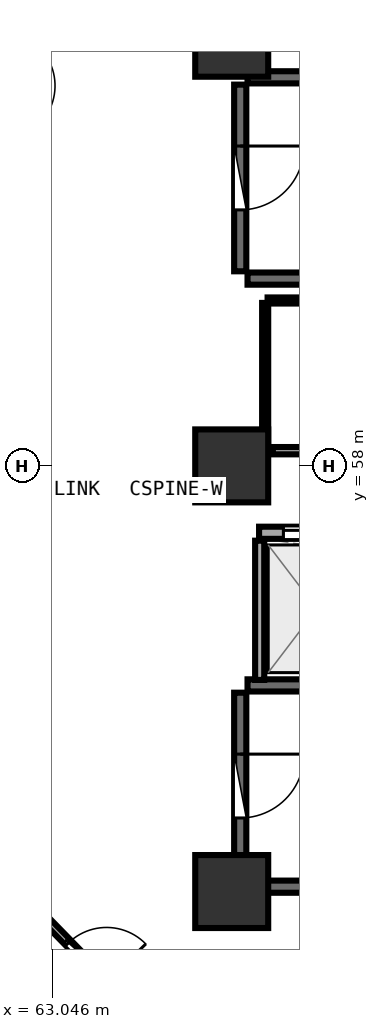
"""IFC4 building model, lengths in metres.
Left out: names, types, materials, properties, quantities, classifications, styles, units other than length and angle.
Written with IfcOpenShell. Run it as: python <this file> out.ifc"""

import sys

from ifc_helpers import new_model, si_unit, direction, frame, frame_2d, origin, origin_2d, place, context, subcontext, project, spatial, rectangle, extrude, element, fill, save


model = new_model("IFC4")
c1 = context("Model", 3, precision=1e-05, world=origin(), true_north=direction((0.0, 1.0)))
c2 = subcontext(c1, "Body", "Model", "MODEL_VIEW")
j1 = project(units=[si_unit("LENGTHUNIT", "METRE"), si_unit("PLANEANGLEUNIT", "RADIAN")], contexts=[c1])
p1 = place(None, origin())
s1 = spatial("IfcSite", under=j1, at=p1, CompositionType="ELEMENT")
p2 = place(p1, origin())
s2 = spatial("IfcBuilding", under=s1, at=p2, CompositionType="ELEMENT")
p3 = place(p2, frame((0.0, 0.0, 161.85)))
s3 = spatial("IfcBuildingStorey", under=s2, at=p3, CompositionType="ELEMENT", Elevation=161.85)
for number, where, z_axis, x_axis in (
    (1, (66.0, 51.0, 0.0), (0.0, 0.0, 1.0), (1.0, 0.0, 0.0)),
    (2, (66.0, 65.0, 0.0), (0.0, 0.0, 1.0), (1.0, 0.0, 0.0)),
    (3, (66.0, 58.0, 0.0), (0.0, 0.0, 1.0), (1.0, 0.0, 0.0)),
):
    element("IfcColumn", number, at=place(p3, frame(where, z_axis=z_axis, x_axis=x_axis)), inside=s3, PredefinedType="PILASTER", context=c2, shape_type="SweptSolid", body=[
        extrude(rectangle(XDim=1.2, YDim=1.2, at=origin_2d()), origin(), (0.0, 0.0, 1.0), 3.75),
    ])
for number, where, z_axis, x_axis in (
    (4, (66.26, 61.08, 0.0), (0.0, 0.0, 1.0), (1.0, 0.0, 0.0)),
    (5, (73.42, 64.39, 0.0), (0.0, 0.0, 1.0), (-1.0, 0.0, 0.0)),
):
    element("IfcWall", number, at=place(p3, frame(where, z_axis=z_axis, x_axis=x_axis)), inside=s3, PredefinedType="SHEAR", context=c2, shape_type="SweptSolid", body=[
        extrude(rectangle(XDim=7.16, YDim=0.2, at=frame_2d((3.58, 0.0))), origin(), (0.0, 0.0, 1.0), 3.49),
    ])
p4 = place(p3, frame((66.14, 64.27, 0.0), z_axis=(0.0, 0.0, 1.0), x_axis=(0.0, -1.0, 0.0)))
e6 = element("IfcWall", 6, at=p4, inside=s3, PredefinedType="SHEAR", context=c2, shape_type="SweptSolid", body=[
    extrude(rectangle(XDim=3.07, YDim=0.2, at=frame_2d((1.535, 0.0))), origin(), (0.0, 0.0, 1.0), 3.49),
])
p5 = place(p4, frame((1.01, 0.0, 0.0)))
e7 = element("IfcOpeningElement", 7, at=p5, cuts=e6, PredefinedType="OPENING", context=c2, shape_type="SweptSolid", body=[
    extrude(rectangle(XDim=1.05, YDim=2.1, at=frame_2d((0.525, 1.05))), frame((0.0, 0.11, 0.0), z_axis=(0.0, -1.0, 0.0), x_axis=(1.0, 0.0, 0.0)), (0.0, 0.0, 1.0), 0.22),
])
for number, where, z_axis, x_axis in (
    (8, (66.26, 51.08, 0.0), (0.0, 0.0, 1.0), (1.0, 0.0, 0.0)),
    (9, (73.42, 54.39, 0.0), (0.0, 0.0, 1.0), (-1.0, 0.0, 0.0)),
):
    element("IfcWall", number, at=place(p3, frame(where, z_axis=z_axis, x_axis=x_axis)), inside=s3, PredefinedType="SHEAR", context=c2, shape_type="SweptSolid", body=[
        extrude(rectangle(XDim=7.16, YDim=0.2, at=frame_2d((3.58, 0.0))), origin(), (0.0, 0.0, 1.0), 3.49),
    ])
p6 = place(p3, frame((66.14, 54.27, 0.0), z_axis=(0.0, 0.0, 1.0), x_axis=(0.0, -1.0, 0.0)))
e10 = element("IfcWall", 10, at=p6, inside=s3, PredefinedType="SHEAR", context=c2, shape_type="SweptSolid", body=[
    extrude(rectangle(XDim=3.07, YDim=0.2, at=frame_2d((1.535, 0.0))), origin(), (0.0, 0.0, 1.0), 3.49),
])
p7 = place(p6, frame((1.01, 0.0, 0.0)))
e11 = element("IfcOpeningElement", 11, at=p7, cuts=e10, PredefinedType="OPENING", context=c2, shape_type="SweptSolid", body=[
    extrude(rectangle(XDim=1.05, YDim=2.1, at=frame_2d((0.525, 1.05))), frame((0.0, 0.11, 0.0), z_axis=(0.0, -1.0, 0.0), x_axis=(1.0, 0.0, 0.0)), (0.0, 0.0, 1.0), 0.22),
])
p8 = place(p3, frame((66.45, 56.9, 0.0), z_axis=(0.0, 0.0, 1.0), x_axis=(1.0, 0.0, 0.0)))
e12 = element("IfcWall", 12, at=p8, inside=s3, PredefinedType="SOLIDWALL", context=c2, shape_type="SweptSolid", body=[
    extrude(rectangle(XDim=14.4, YDim=0.2, at=frame_2d((7.2, 0.0))), origin(), (0.0, 0.0, 1.0), 3.48),
])
p9 = place(p8, frame((0.4, 0.0, 0.0)))
e13 = element("IfcOpeningElement", 13, at=p9, cuts=e12, PredefinedType="OPENING", context=c2, shape_type="SweptSolid", body=[
    extrude(rectangle(XDim=1.1, YDim=2.1, at=frame_2d((0.55, 1.05))), frame((0.0, 0.11, 0.0), z_axis=(0.0, -1.0, 0.0), x_axis=(1.0, 0.0, 0.0)), (0.0, 0.0, 1.0), 0.22),
])
p10 = place(p8, frame((2.4, 0.0, 0.0)))
e14 = element("IfcOpeningElement", 14, at=p10, cuts=e12, PredefinedType="OPENING", context=c2, shape_type="SweptSolid", body=[
    extrude(rectangle(XDim=1.1, YDim=2.1, at=frame_2d((0.55, 1.05))), frame((0.0, 0.11, 0.0), z_axis=(0.0, -1.0, 0.0), x_axis=(1.0, 0.0, 0.0)), (0.0, 0.0, 1.0), 0.22),
])
p11 = place(p8, frame((4.4, 0.0, 0.0)))
e15 = element("IfcOpeningElement", 15, at=p11, cuts=e12, PredefinedType="OPENING", context=c2, shape_type="SweptSolid", body=[
    extrude(rectangle(XDim=1.1, YDim=2.1, at=frame_2d((0.55, 1.05))), frame((0.0, 0.11, 0.0), z_axis=(0.0, -1.0, 0.0), x_axis=(1.0, 0.0, 0.0)), (0.0, 0.0, 1.0), 0.22),
])
p12 = place(p3, frame((66.46, 54.48, 0.0), z_axis=(0.0, 0.0, 1.0), x_axis=(0.0, 1.0, 0.0)))
e16 = element("IfcWall", 16, at=p12, inside=s3, PredefinedType="PARTITIONING", context=c2, shape_type="SweptSolid", body=[
    extrude(rectangle(XDim=2.29, YDim=0.15, at=frame_2d((1.145, 0.0))), origin(), (0.0, 0.0, 1.0), 3.48),
])
p13 = place(p3, frame((66.675, 58.25, 0.0), z_axis=(0.0, 0.0, 1.0), x_axis=(1.0, 0.0, 0.0)))
e17 = element("IfcWall", 17, at=p13, inside=s3, PredefinedType="PARTITIONING", context=c2, shape_type="SweptSolid", body=[
    extrude(rectangle(XDim=3.265, YDim=0.12, at=frame_2d((1.632, 0.0))), origin(), (0.0, 0.0, 1.0), 3.48),
])
p14 = place(p13, frame((1.182, 0.0, 0.0)))
e18 = element("IfcOpeningElement", 18, at=p14, cuts=e17, PredefinedType="OPENING", context=c2, shape_type="SweptSolid", body=[
    extrude(rectangle(XDim=0.9, YDim=2.08, at=frame_2d((0.45, 1.04))), frame((0.0, 0.07, 0.0), z_axis=(0.0, -1.0, 0.0), x_axis=(1.0, 0.0, 0.0)), (0.0, 0.0, 1.0), 0.14),
])
p15 = place(p3, frame((63.462, 66.038, 0.0), z_axis=(0.0, 0.0, 1.0), x_axis=(-0.578762045024, -0.815496471629, 0.0)))
e19 = element("IfcWall", 19, at=p15, inside=s3, PredefinedType="PARTITIONING", context=c2, shape_type="SweptSolid", body=[
    extrude(rectangle(XDim=3.483, YDim=0.12, at=frame_2d((1.741, 0.0))), origin(), (0.0, 0.0, 1.0), 2.975),
])
p16 = place(p15, frame((1.291, 0.0, 0.0)))
e20 = element("IfcOpeningElement", 20, at=p16, cuts=e19, PredefinedType="OPENING", context=c2, shape_type="SweptSolid", body=[
    extrude(rectangle(XDim=0.9, YDim=2.08, at=frame_2d((0.45, 1.04))), frame((0.0, 0.07, 0.0), z_axis=(0.0, -1.0, 0.0), x_axis=(1.0, 0.0, 0.0)), (0.0, 0.0, 1.0), 0.14),
])
p17 = place(p3, frame((62.977, 50.5, 0.0), z_axis=(0.0, 0.0, 1.0), x_axis=(0.69801962686, -0.71607862733, 0.0)))
e21 = element("IfcWall", 21, at=p17, inside=s3, PredefinedType="PARTITIONING", context=c2, shape_type="SweptSolid", body=[
    extrude(rectangle(XDim=1.866, YDim=0.12, at=frame_2d((0.933, 0.0))), origin(), (0.0, 0.0, 1.0), 2.975),
])
p18 = place(p17, frame((0.483, 0.0, 0.0)))
e22 = element("IfcOpeningElement", 22, at=p18, cuts=e21, PredefinedType="OPENING", context=c2, shape_type="SweptSolid", body=[
    extrude(rectangle(XDim=0.9, YDim=2.08, at=frame_2d((0.45, 1.04))), frame((0.0, 0.07, 0.0), z_axis=(0.0, -1.0, 0.0), x_axis=(1.0, 0.0, 0.0)), (0.0, 0.0, 1.0), 0.14),
])
p19 = place(p3, frame((69.96, 60.72, 0.0), z_axis=(0.0, 0.0, 1.0), x_axis=(-1.0, 0.0, 0.0)))
e23 = element("IfcWall", 23, at=p19, inside=s3, PredefinedType="PARTITIONING", context=c2, shape_type="SweptSolid", body=[
    extrude(rectangle(XDim=3.37, YDim=0.1, at=frame_2d((1.685, 0.0))), origin(), (0.0, 0.0, 1.0), 3.48),
])
p20 = place(p3, frame((66.55, 60.68, 0.0), z_axis=(0.0, 0.0, 1.0), x_axis=(0.0, -1.0, 0.0)))
e24 = element("IfcWall", 24, at=p20, inside=s3, PredefinedType="PARTITIONING", context=c2, shape_type="SweptSolid", body=[
    extrude(rectangle(XDim=2.383, YDim=0.1, at=frame_2d((1.191, 0.0))), origin(), (0.0, 0.0, 1.0), 3.48),
])
p21 = place(p5, origin())
e25 = element("IfcDoor", 25, at=p21, inside=s3, OperationType="SINGLE_SWING_LEFT", PredefinedType="DOOR", context=c2, shape_type="SweptSolid", body=[
    extrude(rectangle(XDim=1.05, YDim=2.1, at=frame_2d((0.525, 1.05))), frame((0.0, 0.025, 0.0), z_axis=(0.0, -1.0, 0.0), x_axis=(1.0, 0.0, 0.0)), (0.0, 0.0, 1.0), 0.05),
])
fill(e7, e25)
p22 = place(p7, origin())
e26 = element("IfcDoor", 26, at=p22, inside=s3, OperationType="SINGLE_SWING_LEFT", PredefinedType="DOOR", context=c2, shape_type="SweptSolid", body=[
    extrude(rectangle(XDim=1.05, YDim=2.1, at=frame_2d((0.525, 1.05))), frame((0.0, 0.025, 0.0), z_axis=(0.0, -1.0, 0.0), x_axis=(1.0, 0.0, 0.0)), (0.0, 0.0, 1.0), 0.05),
])
fill(e11, e26)
p23 = place(p9, origin())
e27 = element("IfcDoor", 27, at=p23, inside=s3, OperationType="DOUBLE_DOOR_SLIDING", PredefinedType="DOOR", context=c2, shape_type="SweptSolid", body=[
    extrude(rectangle(XDim=1.1, YDim=2.1, at=frame_2d((0.55, 1.05))), frame((0.0, 0.025, 0.0), z_axis=(0.0, -1.0, 0.0), x_axis=(1.0, 0.0, 0.0)), (0.0, 0.0, 1.0), 0.05),
])
fill(e13, e27)
p24 = place(p18, origin())
e28 = element("IfcDoor", 28, at=p24, inside=s3, OperationType="SINGLE_SWING_RIGHT", PredefinedType="DOOR", context=c2, shape_type="SweptSolid", body=[
    extrude(rectangle(XDim=0.9, YDim=2.08, at=frame_2d((0.45, 1.04))), frame((0.0, 0.025, 0.0), z_axis=(0.0, -1.0, 0.0), x_axis=(1.0, 0.0, 0.0)), (0.0, 0.0, 1.0), 0.05),
])
fill(e22, e28)
save(model, sys.argv[1])
